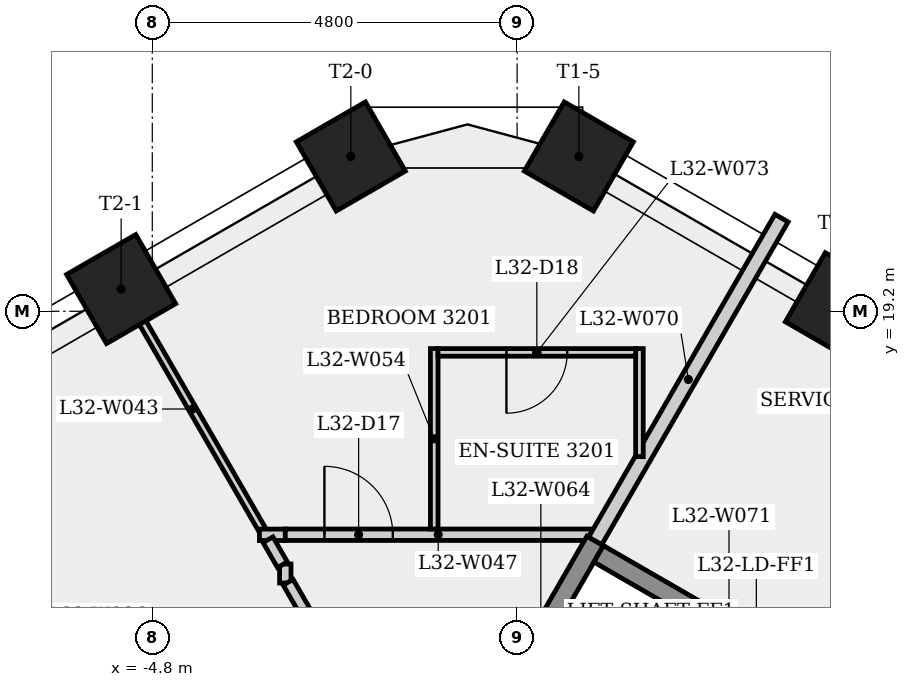
"""IFC4 building model, lengths in metres.
Left out: names, types, materials, properties, quantities, classifications, styles, units other than length and angle.
Written with IfcOpenShell. Run it as: python <this file> out.ifc"""

import sys

from ifc_helpers import new_model, si_unit, direction, frame, frame_2d, origin, origin_2d, place, context, subcontext, project, spatial, rectangle, extrude, element, fill, save


model = new_model("IFC4")
c1 = context("Model", 3, precision=1e-05, world=origin(), true_north=direction((0.0, 1.0)))
c2 = subcontext(c1, "Body", "Model", "MODEL_VIEW")
j1 = project(units=[si_unit("LENGTHUNIT", "METRE"), si_unit("PLANEANGLEUNIT", "RADIAN")], contexts=[c1])
p1 = place(None, origin())
s1 = spatial("IfcSite", under=j1, at=p1, CompositionType="ELEMENT")
p2 = place(p1, origin())
s2 = spatial("IfcBuilding", under=s1, at=p2, CompositionType="ELEMENT")
p3 = place(p2, frame((0.0, 0.0, 120.5)))
s3 = spatial("IfcBuildingStorey", under=s2, at=p3, CompositionType="ELEMENT", Elevation=120.5)
for number, where, z_axis, x_axis in (
    (1, (4.247, 19.254, 0.0), (0.0, 0.0, 1.0), (0.5, 0.866, 0.0)),
    (2, (0.812, 21.237, 0.0), (0.0, 0.0, 1.0), (0.5, 0.866, 0.0)),
    (3, (-2.188, 21.237, 0.0), (0.0, 0.0, 1.0), (-0.5, 0.866, 0.0)),
    (4, (-5.21, 19.492, 0.0), (0.0, 0.0, 1.0), (-0.5, 0.866, 0.0)),
):
    element("IfcColumn", number, at=place(p3, frame(where, z_axis=z_axis, x_axis=x_axis)), inside=s3, PredefinedType="COLUMN", context=c2, shape_type="SweptSolid", body=[
        extrude(rectangle(XDim=1.05, YDim=1.05, at=origin_2d()), origin(), (0.0, 0.0, 1.0), 4.0),
    ])
p4 = place(p3, frame((-8.225, 17.751, 0.0), z_axis=(0.0, 0.0, 1.0), x_axis=(0.500021201058, -0.866013163002, 0.0)))
e5 = element("IfcWall", 5, at=p4, inside=s3, PredefinedType="PARTITIONING", context=c2, shape_type="SweptSolid", body=[
    extrude(rectangle(XDim=7.711, YDim=0.1, at=frame_2d((3.855, 0.0))), origin(), (0.0, 0.0, 1.0), 3.6),
])
p5 = place(p3, frame((-3.353, 16.324, 0.0), z_axis=(0.0, 0.0, 1.0), x_axis=(-0.499971846079, 0.866041657848, 0.0)))
e6 = element("IfcWall", 6, at=p5, inside=s3, PredefinedType="PARTITIONING", context=c2, shape_type="SweptSolid", body=[
    extrude(rectangle(XDim=3.672, YDim=0.1, at=frame_2d((1.836, 0.0))), origin(), (0.0, 0.0, 1.0), 3.6),
])
p6 = place(p3, frame((-3.39, 16.259, 0.0), z_axis=(0.0, 0.0, 1.0), x_axis=(1.0, 0.0, 0.0)))
e7 = element("IfcWall", 7, at=p6, inside=s3, PredefinedType="PARTITIONING", context=c2, shape_type="SweptSolid", body=[
    extrude(rectangle(XDim=0.34, YDim=0.15, at=frame_2d((0.17, 0.0))), origin(), (0.0, 0.0, 1.0), 3.6),
])
p7 = place(p3, frame((-3.05, 15.625, 0.0), z_axis=(0.0, 0.0, 1.0), x_axis=(0.0, 1.0, 0.0)))
e8 = element("IfcWall", 8, at=p7, inside=s3, PredefinedType="PARTITIONING", context=c2, shape_type="SweptSolid", body=[
    extrude(rectangle(XDim=0.25, YDim=0.15, at=frame_2d((0.125, 0.0))), origin(), (0.0, 0.0, 1.0), 3.6),
])
p8 = place(p3, frame((-3.087, 15.865, 0.0), z_axis=(0.0, 0.0, 1.0), x_axis=(-0.500074377092, 0.865982457891, 0.0)))
e9 = element("IfcWall", 9, at=p8, inside=s3, PredefinedType="PARTITIONING", context=c2, shape_type="SweptSolid", body=[
    extrude(rectangle(XDim=0.38, YDim=0.15, at=frame_2d((0.19, 0.0))), origin(), (0.0, 0.0, 1.0), 3.6),
])
p9 = place(p3, frame((-3.05, 16.26, 0.0), z_axis=(0.0, 0.0, 1.0), x_axis=(1.0, 0.0, 0.0)))
e10 = element("IfcWall", 10, at=p9, inside=s3, PredefinedType="PARTITIONING", context=c2, shape_type="SweptSolid", body=[
    extrude(rectangle(XDim=4.024, YDim=0.15, at=frame_2d((2.012, 0.0))), origin(), (0.0, 0.0, 1.0), 3.6),
])
p10 = place(p9, frame((0.515, 0.0, 0.0)))
e11 = element("IfcOpeningElement", 11, at=p10, cuts=e10, PredefinedType="OPENING", context=c2, shape_type="SweptSolid", body=[
    extrude(rectangle(XDim=0.9, YDim=2.1, at=frame_2d((0.45, 1.05))), frame((0.0, 0.085, 0.0), z_axis=(0.0, -1.0, 0.0), x_axis=(1.0, 0.0, 0.0)), (0.0, 0.0, 1.0), 0.17),
])
p11 = place(p3, frame((-1.402, 12.845, 0.0), z_axis=(0.0, 0.0, 1.0), x_axis=(-0.499978313311, 0.866037924238, 0.0)))
e12 = element("IfcWall", 12, at=p11, inside=s3, PredefinedType="PARTITIONING", context=c2, shape_type="SweptSolid", body=[
    extrude(rectangle(XDim=3.221, YDim=0.15, at=frame_2d((1.611, 0.0))), origin(), (0.0, 0.0, 1.0), 3.6),
])
p12 = place(p11, frame((1.111, 0.0, 0.0)))
e13 = element("IfcOpeningElement", 13, at=p12, cuts=e12, PredefinedType="OPENING", context=c2, shape_type="SweptSolid", body=[
    extrude(rectangle(XDim=1.0, YDim=2.1, at=frame_2d((0.5, 1.05))), frame((0.0, 0.085, 0.0), z_axis=(0.0, -1.0, 0.0), x_axis=(1.0, 0.0, 0.0)), (0.0, 0.0, 1.0), 0.17),
])
p13 = place(p3, frame((-1.091, 18.709, 0.0), z_axis=(0.0, 0.0, 1.0), x_axis=(0.0, -1.0, 0.0)))
e14 = element("IfcWall", 14, at=p13, inside=s3, PredefinedType="PARTITIONING", context=c2, shape_type="SweptSolid", body=[
    extrude(rectangle(XDim=2.374, YDim=0.1, at=frame_2d((1.187, 0.0))), origin(), (0.0, 0.0, 1.0), 3.6),
])
p14 = place(p3, frame((-0.403, 13.702, 0.0), z_axis=(0.0, 0.0, 1.0), x_axis=(0.499976111731, 0.866039195244, 0.0)))
e15 = element("IfcWall", 15, at=p14, inside=s3, PredefinedType="SHEAR", context=c2, shape_type="SweptSolid", body=[
    extrude(rectangle(XDim=2.861, YDim=0.25, at=frame_2d((1.43, 0.0))), origin(), (0.0, 0.0, 1.0), 3.6),
])
p15 = place(p3, frame((1.027, 16.179, 0.0), z_axis=(0.0, 0.0, 1.0), x_axis=(0.499999703803, 0.866025574794, 0.0)))
e16 = element("IfcWall", 16, at=p15, inside=s3, PredefinedType="PLUMBINGWALL", context=c2, shape_type="SweptSolid", body=[
    extrude(rectangle(XDim=4.904, YDim=0.2, at=frame_2d((2.452, 0.0))), origin(), (0.0, 0.0, 1.0), 3.6),
])
p16 = place(p3, frame((1.073, 16.008, 0.0), z_axis=(0.0, 0.0, 1.0), x_axis=(0.866040211805, -0.499974350878, 0.0)))
e17 = element("IfcWall", 17, at=p16, inside=s3, PredefinedType="SHEAR", context=c2, shape_type="SweptSolid", body=[
    extrude(rectangle(XDim=3.3, YDim=0.25, at=frame_2d((1.65, 0.0))), origin(), (0.0, 0.0, 1.0), 3.6),
])
p17 = place(p3, frame((1.609, 17.288, 0.0), z_axis=(0.0, 0.0, 1.0), x_axis=(0.0, 1.0, 0.0)))
e18 = element("IfcWall", 18, at=p17, inside=s3, PredefinedType="PARTITIONING", context=c2, shape_type="SweptSolid", body=[
    extrude(rectangle(XDim=1.421, YDim=0.1, at=frame_2d((0.711, 0.0))), origin(), (0.0, 0.0, 1.0), 3.6),
])
p18 = place(p3, frame((1.559, 18.659, 0.0), z_axis=(0.0, 0.0, 1.0), x_axis=(-1.0, 0.0, 0.0)))
e19 = element("IfcWall", 19, at=p18, inside=s3, PredefinedType="PARTITIONING", context=c2, shape_type="SweptSolid", body=[
    extrude(rectangle(XDim=2.6, YDim=0.1, at=frame_2d((1.3, 0.0))), origin(), (0.0, 0.0, 1.0), 3.6),
])
p19 = place(p18, frame((0.9, 0.0, 0.0)))
e20 = element("IfcOpeningElement", 20, at=p19, cuts=e19, PredefinedType="OPENING", context=c2, shape_type="SweptSolid", body=[
    extrude(rectangle(XDim=0.8, YDim=2.1, at=frame_2d((0.4, 1.05))), frame((0.0, 0.06, 0.0), z_axis=(0.0, -1.0, 0.0), x_axis=(1.0, 0.0, 0.0)), (0.0, 0.0, 1.0), 0.12),
])
p20 = place(p3, frame((3.885, 14.529, 0.0), z_axis=(0.0, 0.0, 1.0), x_axis=(0.499997628298, 0.866026773083, 0.0)))
e21 = element("IfcWall", 21, at=p20, inside=s3, PredefinedType="PLUMBINGWALL", context=c2, shape_type="SweptSolid", body=[
    extrude(rectangle(XDim=1.075, YDim=0.2, at=frame_2d((0.538, 0.0))), origin(), (0.0, 0.0, 1.0), 3.6),
])
p21 = place(p10, origin())
e22 = element("IfcDoor", 22, at=p21, inside=s3, OperationType="SINGLE_SWING_LEFT", PredefinedType="DOOR", context=c2, shape_type="SweptSolid", body=[
    extrude(rectangle(XDim=0.9, YDim=2.1, at=frame_2d((0.45, 1.05))), frame((0.0, 0.025, 0.0), z_axis=(0.0, -1.0, 0.0), x_axis=(1.0, 0.0, 0.0)), (0.0, 0.0, 1.0), 0.05),
])
fill(e11, e22)
p22 = place(p19, origin())
e23 = element("IfcDoor", 23, at=p22, inside=s3, OperationType="SINGLE_SWING_RIGHT", PredefinedType="DOOR", context=c2, shape_type="SweptSolid", body=[
    extrude(rectangle(XDim=0.8, YDim=2.1, at=frame_2d((0.4, 1.05))), frame((0.0, 0.025, 0.0), z_axis=(0.0, -1.0, 0.0), x_axis=(1.0, 0.0, 0.0)), (0.0, 0.0, 1.0), 0.05),
])
fill(e20, e23)
save(model, sys.argv[1])
